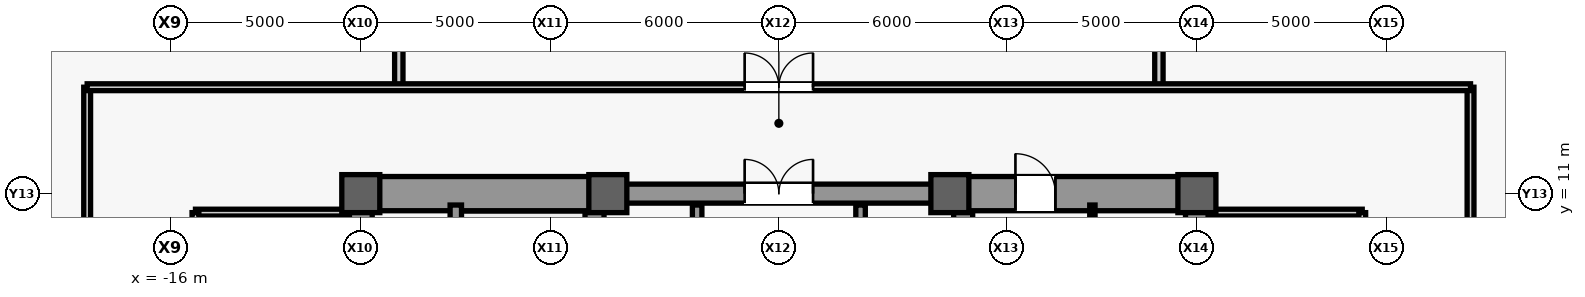
"""IFC4 building model, lengths in metres.
Left out: names, types, materials, properties, quantities, classifications, styles, units other than length and angle.
Written with IfcOpenShell. Run it as: python <this file> out.ifc"""

import sys

from ifc_helpers import new_model, si_unit, direction, frame, frame_2d, origin, origin_2d, place, context, subcontext, project, spatial, rectangle, extrude, source, transform, mapped, element, fill, save


model = new_model("IFC4")
c1 = context("Model", 3, precision=1e-05, world=origin(), true_north=direction((0.0, 1.0)))
c2 = subcontext(c1, "Body", "Model", "MODEL_VIEW")
j1 = project(units=[si_unit("LENGTHUNIT", "METRE"), si_unit("PLANEANGLEUNIT", "RADIAN")], contexts=[c1])
p1 = place(None, origin())
s1 = spatial("IfcSite", under=j1, at=p1, CompositionType="ELEMENT")
p2 = place(p1, origin())
s2 = spatial("IfcBuilding", under=s1, at=p2, CompositionType="ELEMENT")
p3 = place(p2, origin())
s3 = spatial("IfcBuildingStorey", under=s2, at=p3, CompositionType="ELEMENT", Elevation=0.0)
m1 = source(origin(), c2, "Body", "SweptSolid", [
    extrude(rectangle(XDim=22.0, YDim=0.6, at=frame_2d((11.0, 0.0))), origin(), (0.0, 0.0, 1.0), 6.28),
])
p4 = place(p3, frame((-11.0, -11.0, 0.0), z_axis=(0.0, 0.0, 1.0), x_axis=(0.0, 1.0, 0.0)))
e1 = element("IfcWall", 1, at=p4, inside=s3, PredefinedType="SHEAR", context=c2, shape_type="MappedRepresentation", body=[
    mapped(m1, transform((0.0, 0.0, 0.0), scale=1.0)),
])
m2 = source(origin(), c2, "Body", "SweptSolid", [
    extrude(rectangle(XDim=1.1, YDim=2.2, at=frame_2d((0.55, 1.1))), frame((0.0, 0.31, 0.0), z_axis=(0.0, -1.0, 0.0), x_axis=(1.0, 0.0, 0.0)), (0.0, 0.0, 1.0), 0.62),
])
p5 = place(p4, frame((0.8, 0.0, 0.0)))
e2 = element("IfcOpeningElement", 2, at=p5, cuts=e1, PredefinedType="OPENING", context=c2, shape_type="MappedRepresentation", body=[
    mapped(m2, transform((0.0, 0.0, 0.0), scale=1.0)),
])
p6 = place(p4, frame((12.5, 0.0, 0.0)))
e3 = element("IfcOpeningElement", 3, at=p6, cuts=e1, PredefinedType="OPENING", context=c2, shape_type="MappedRepresentation", body=[
    mapped(m2, transform((0.0, 0.0, 0.0), scale=1.0)),
])
m3 = source(origin(), c2, "Body", "SweptSolid", [
    extrude(rectangle(XDim=0.9, YDim=2.15, at=frame_2d((0.45, 1.075))), frame((0.0, 0.31, 0.0), z_axis=(0.0, -1.0, 0.0), x_axis=(1.0, 0.0, 0.0)), (0.0, 0.0, 1.0), 0.62),
])
p7 = place(p4, frame((6.85, 0.0, 0.0)))
e4 = element("IfcOpeningElement", 4, at=p7, cuts=e1, PredefinedType="OPENING", context=c2, shape_type="MappedRepresentation", body=[
    mapped(m3, transform((0.0, 0.0, 0.0), scale=1.0)),
])
m4 = source(origin(), c2, "Body", "SweptSolid", [
    extrude(rectangle(XDim=1.2, YDim=2.3, at=frame_2d((0.6, 1.15))), frame((0.0, 0.31, 0.0), z_axis=(0.0, -1.0, 0.0), x_axis=(1.0, 0.0, 0.0)), (0.0, 0.0, 1.0), 0.62),
])
p8 = place(p4, frame((14.6, 0.0, 0.0)))
e5 = element("IfcOpeningElement", 5, at=p8, cuts=e1, PredefinedType="OPENING", context=c2, shape_type="MappedRepresentation", body=[
    mapped(m4, transform((0.0, 0.0, 0.0), scale=1.0)),
])
p9 = place(p4, frame((18.2, 0.0, 0.0)))
e6 = element("IfcOpeningElement", 6, at=p9, cuts=e1, PredefinedType="OPENING", context=c2, shape_type="MappedRepresentation", body=[
    mapped(m4, transform((0.0, 0.0, 0.0), scale=1.0)),
])
m5 = source(origin(), c2, "Body", "SweptSolid", [
    extrude(rectangle(XDim=1.3, YDim=2.3, at=frame_2d((0.65, 1.15))), frame((0.0, 0.31, 0.0), z_axis=(0.0, -1.0, 0.0), x_axis=(1.0, 0.0, 0.0)), (0.0, 0.0, 1.0), 0.62),
])
p10 = place(p4, frame((2.7, 0.0, 0.0)))
e7 = element("IfcOpeningElement", 7, at=p10, cuts=e1, PredefinedType="OPENING", context=c2, shape_type="MappedRepresentation", body=[
    mapped(m5, transform((0.0, 0.0, 0.0), scale=1.0)),
])
p11 = place(p3, frame((11.0, -11.0, 0.0), z_axis=(0.0, 0.0, 1.0), x_axis=(0.0, 1.0, 0.0)))
e8 = element("IfcWall", 8, at=p11, inside=s3, PredefinedType="SHEAR", context=c2, shape_type="MappedRepresentation", body=[
    mapped(m1, transform((0.0, 0.0, 0.0), scale=1.0)),
])
p12 = place(p11, frame((0.8, 0.0, 0.0)))
e9 = element("IfcOpeningElement", 9, at=p12, cuts=e8, PredefinedType="OPENING", context=c2, shape_type="MappedRepresentation", body=[
    mapped(m2, transform((0.0, 0.0, 0.0), scale=1.0)),
])
p13 = place(p11, frame((6.2, 0.0, 0.0)))
e10 = element("IfcOpeningElement", 10, at=p13, cuts=e8, PredefinedType="OPENING", context=c2, shape_type="MappedRepresentation", body=[
    mapped(m3, transform((0.0, 0.0, 0.0), scale=1.0)),
])
p14 = place(p11, frame((8.05, 0.0, 0.0)))
e11 = element("IfcOpeningElement", 11, at=p14, cuts=e8, PredefinedType="OPENING", context=c2, shape_type="MappedRepresentation", body=[
    mapped(m3, transform((0.0, 0.0, 0.0), scale=1.0)),
])
p15 = place(p11, frame((2.7, 0.0, 0.0)))
e12 = element("IfcOpeningElement", 12, at=p15, cuts=e8, PredefinedType="OPENING", context=c2, shape_type="MappedRepresentation", body=[
    mapped(m5, transform((0.0, 0.0, 0.0), scale=1.0)),
])
p16 = place(p11, frame((13.35, 0.0, 0.0)))
e13 = element("IfcOpeningElement", 13, at=p16, cuts=e8, PredefinedType="OPENING", context=c2, shape_type="MappedRepresentation", body=[
    mapped(m5, transform((0.0, 0.0, 0.0), scale=1.0)),
])
m6 = source(origin(), c2, "Body", "SweptSolid", [
    extrude(rectangle(XDim=21.4, YDim=0.5, at=frame_2d((10.7, 0.0))), origin(), (0.0, 0.0, 1.0), 6.28),
])
for number, where, z_axis, x_axis in (
    (14, (-4.85, -10.7, 0.0), (0.0, 0.0, 1.0), (0.0, 1.0, 0.0)),
    (15, (4.85, -10.7, 0.0), (0.0, 0.0, 1.0), (0.0, 1.0, 0.0)),
):
    element("IfcWall", number, at=place(p3, frame(where, z_axis=z_axis, x_axis=x_axis)), inside=s3, PredefinedType="SHEAR", context=c2, shape_type="MappedRepresentation", body=[
        mapped(m6, transform((0.0, 0.0, 0.0), scale=1.0)),
    ])
m7 = source(origin(), c2, "Body", "SweptSolid", [
    extrude(rectangle(XDim=5.85, YDim=0.9, at=frame_2d((2.925, 0.0))), origin(), (0.0, 0.0, 1.0), 6.28),
])
p17 = place(p3, frame((-10.7, 11.0, 0.0), z_axis=(0.0, 0.0, 1.0), x_axis=(1.0, 0.0, 0.0)))
e16 = element("IfcWall", 16, at=p17, inside=s3, PredefinedType="SHEAR", context=c2, shape_type="MappedRepresentation", body=[
    mapped(m7, transform((0.0, 0.0, 0.0), scale=1.0)),
])
p18 = place(p3, frame((4.85, 11.0, 0.0), z_axis=(0.0, 0.0, 1.0), x_axis=(1.0, 0.0, 0.0)))
e17 = element("IfcWall", 17, at=p18, inside=s3, PredefinedType="SHEAR", context=c2, shape_type="MappedRepresentation", body=[
    mapped(m7, transform((0.0, 0.0, 0.0), scale=1.0)),
])
m8 = source(origin(), c2, "Body", "SweptSolid", [
    extrude(rectangle(XDim=1.05, YDim=2.2, at=frame_2d((0.525, 1.1))), frame((0.0, 0.46, 0.0), z_axis=(0.0, -1.0, 0.0), x_axis=(1.0, 0.0, 0.0)), (0.0, 0.0, 1.0), 0.92),
])
p19 = place(p18, frame((1.375, 0.0, 0.0)))
e18 = element("IfcOpeningElement", 18, at=p19, cuts=e17, PredefinedType="OPENING", context=c2, shape_type="MappedRepresentation", body=[
    mapped(m8, transform((0.0, 0.0, 0.0), scale=1.0)),
])
m9 = source(origin(), c2, "Body", "SweptSolid", [
    extrude(rectangle(XDim=9.2, YDim=0.5, at=frame_2d((4.6, 0.0))), origin(), (0.0, 0.0, 1.0), 6.28),
])
p20 = place(p3, frame((-4.6, 11.0, 0.0), z_axis=(0.0, 0.0, 1.0), x_axis=(1.0, 0.0, 0.0)))
e19 = element("IfcWall", 19, at=p20, inside=s3, PredefinedType="SHEAR", context=c2, shape_type="MappedRepresentation", body=[
    mapped(m9, transform((0.0, 0.0, 0.0), scale=1.0)),
])
m10 = source(origin(), c2, "Body", "SweptSolid", [
    extrude(rectangle(XDim=1.8, YDim=2.25, at=frame_2d((0.9, 1.125))), frame((0.0, 0.26, 0.0), z_axis=(0.0, -1.0, 0.0), x_axis=(1.0, 0.0, 0.0)), (0.0, 0.0, 1.0), 0.52),
])
p21 = place(p20, frame((3.7, 0.0, 0.0)))
e20 = element("IfcOpeningElement", 20, at=p21, cuts=e19, PredefinedType="OPENING", context=c2, shape_type="MappedRepresentation", body=[
    mapped(m10, transform((0.0, 0.0, 0.0), scale=1.0)),
])
m11 = source(origin(), c2, "Body", "SweptSolid", [
    extrude(rectangle(XDim=1.0, YDim=1.0, at=origin_2d()), origin(), (0.0, 0.0, 1.0), 6.6),
])
for number, where, z_axis, x_axis in (
    (21, (-11.0, 11.0, 0.0), (0.0, 0.0, 1.0), (1.0, 0.0, 0.0)),
    (22, (-4.5, 11.0, 0.0), (0.0, 0.0, 1.0), (1.0, 0.0, 0.0)),
    (23, (4.5, 11.0, 0.0), (0.0, 0.0, 1.0), (1.0, 0.0, 0.0)),
    (24, (11.0, 11.0, 0.0), (0.0, 0.0, 1.0), (1.0, 0.0, 0.0)),
):
    element("IfcColumn", number, at=place(p3, frame(where, z_axis=z_axis, x_axis=x_axis)), inside=s3, PredefinedType="COLUMN", context=c2, shape_type="MappedRepresentation", body=[
        mapped(m11, transform((0.0, 0.0, 0.0), scale=1.0)),
    ])
m12 = source(origin(), c2, "Body", "SweptSolid", [
    extrude(rectangle(XDim=7.75, YDim=0.3, at=frame_2d((3.875, 0.0))), origin(), (0.0, 0.0, 1.0), 6.28),
])
p22 = place(p3, frame((-8.5, 2.95, 0.0), z_axis=(0.0, 0.0, 1.0), x_axis=(0.0, 1.0, 0.0)))
e25 = element("IfcWall", 25, at=p22, inside=s3, PredefinedType="SHEAR", context=c2, shape_type="MappedRepresentation", body=[
    mapped(m12, transform((0.0, 0.0, 0.0), scale=1.0)),
])
m13 = source(origin(), c2, "Body", "SweptSolid", [
    extrude(rectangle(XDim=9.4, YDim=0.14, at=frame_2d((4.7, 0.0))), origin(), (0.0, 0.0, 1.0), 6.28),
])
p23 = place(p3, frame((8.25, 1.3, 0.0), z_axis=(0.0, 0.0, 1.0), x_axis=(0.0, 1.0, 0.0)))
e26 = element("IfcWall", 26, at=p23, inside=s3, PredefinedType="PARTITIONING", context=c2, shape_type="MappedRepresentation", body=[
    mapped(m13, transform((0.0, 0.0, 0.0), scale=1.0)),
])
m14 = source(origin(), c2, "Body", "SweptSolid", [
    extrude(rectangle(XDim=4.05, YDim=0.18, at=frame_2d((2.025, 0.0))), origin(), (0.0, 0.0, 1.0), 6.28),
])
p24 = place(p3, frame((-15.35, 10.5, 0.0), z_axis=(0.0, 0.0, 1.0), x_axis=(1.0, 0.0, 0.0)))
e27 = element("IfcWall", 27, at=p24, inside=s3, PredefinedType="PARTITIONING", context=c2, shape_type="MappedRepresentation", body=[
    mapped(m14, transform((0.0, 0.0, 0.0), scale=1.0)),
])
m15 = source(origin(), c2, "Body", "SweptSolid", [
    extrude(rectangle(XDim=16.6, YDim=0.18, at=frame_2d((8.3, 0.0))), origin(), (0.0, 0.0, 1.0), 6.28),
])
p25 = place(p3, frame((-15.35, -6.1, 0.0), z_axis=(0.0, 0.0, 1.0), x_axis=(0.0, 1.0, 0.0)))
e28 = element("IfcWall", 28, at=p25, inside=s3, PredefinedType="PARTITIONING", context=c2, shape_type="MappedRepresentation", body=[
    mapped(m15, transform((0.0, 0.0, 0.0), scale=1.0)),
])
m16 = source(origin(), c2, "Body", "SweptSolid", [
    extrude(rectangle(XDim=1.8, YDim=2.25, at=frame_2d((0.9, 1.125))), frame((0.0, 0.1, 0.0), z_axis=(0.0, -1.0, 0.0), x_axis=(1.0, 0.0, 0.0)), (0.0, 0.0, 1.0), 0.2),
])
p26 = place(p25, frame((2.7, 0.0, 0.0)))
e29 = element("IfcOpeningElement", 29, at=p26, cuts=e28, PredefinedType="OPENING", context=c2, shape_type="MappedRepresentation", body=[
    mapped(m16, transform((0.0, 0.0, 0.0), scale=1.0)),
])
p27 = place(p25, frame((11.0, 0.0, 0.0)))
e30 = element("IfcOpeningElement", 30, at=p27, cuts=e28, PredefinedType="OPENING", context=c2, shape_type="MappedRepresentation", body=[
    mapped(m16, transform((0.0, 0.0, 0.0), scale=1.0)),
])
p28 = place(p3, frame((11.3, 10.5, 0.0), z_axis=(0.0, 0.0, 1.0), x_axis=(1.0, 0.0, 0.0)))
e31 = element("IfcWall", 31, at=p28, inside=s3, PredefinedType="PARTITIONING", context=c2, shape_type="MappedRepresentation", body=[
    mapped(m14, transform((0.0, 0.0, 0.0), scale=1.0)),
])
p29 = place(p3, frame((15.35, -6.1, 0.0), z_axis=(0.0, 0.0, 1.0), x_axis=(0.0, 1.0, 0.0)))
e32 = element("IfcWall", 32, at=p29, inside=s3, PredefinedType="PARTITIONING", context=c2, shape_type="MappedRepresentation", body=[
    mapped(m15, transform((0.0, 0.0, 0.0), scale=1.0)),
])
p30 = place(p29, frame((2.7, 0.0, 0.0)))
e33 = element("IfcOpeningElement", 33, at=p30, cuts=e32, PredefinedType="OPENING", context=c2, shape_type="MappedRepresentation", body=[
    mapped(m16, transform((0.0, 0.0, 0.0), scale=1.0)),
])
p31 = place(p29, frame((13.0, 0.0, 0.0)))
e34 = element("IfcOpeningElement", 34, at=p31, cuts=e32, PredefinedType="OPENING", context=c2, shape_type="MappedRepresentation", body=[
    mapped(m16, transform((0.0, 0.0, 0.0), scale=1.0)),
])
m17 = source(origin(), c2, "Body", "SweptSolid", [
    extrude(rectangle(XDim=5.4, YDim=0.25, at=frame_2d((2.7, 0.0))), origin(), (0.0, 0.0, 1.0), 6.28),
])
p32 = place(p3, frame((-2.15, 5.3, 0.0), z_axis=(0.0, 0.0, 1.0), x_axis=(0.0, 1.0, 0.0)))
e35 = element("IfcWall", 35, at=p32, inside=s3, PredefinedType="SHEAR", context=c2, shape_type="MappedRepresentation", body=[
    mapped(m17, transform((0.0, 0.0, 0.0), scale=1.0)),
])
m18 = source(origin(), c2, "Body", "SweptSolid", [
    extrude(rectangle(XDim=1.2, YDim=2.3, at=frame_2d((0.6, 1.15))), frame((0.0, 0.135, 0.0), z_axis=(0.0, -1.0, 0.0), x_axis=(1.0, 0.0, 0.0)), (0.0, 0.0, 1.0), 0.27),
])
p33 = place(p32, frame((3.3, 0.0, 0.0)))
e36 = element("IfcOpeningElement", 36, at=p33, cuts=e35, PredefinedType="OPENING", context=c2, shape_type="MappedRepresentation", body=[
    mapped(m18, transform((0.0, 0.0, 0.0), scale=1.0)),
])
p34 = place(p3, frame((2.15, 5.3, 0.0), z_axis=(0.0, 0.0, 1.0), x_axis=(0.0, 1.0, 0.0)))
e37 = element("IfcWall", 37, at=p34, inside=s3, PredefinedType="SHEAR", context=c2, shape_type="MappedRepresentation", body=[
    mapped(m17, transform((0.0, 0.0, 0.0), scale=1.0)),
])
p35 = place(p34, frame((3.3, 0.0, 0.0)))
e38 = element("IfcOpeningElement", 38, at=p35, cuts=e37, PredefinedType="OPENING", context=c2, shape_type="MappedRepresentation", body=[
    mapped(m18, transform((0.0, 0.0, 0.0), scale=1.0)),
])
m19 = source(origin(), c2, "Body", "SweptSolid", [
    extrude(rectangle(XDim=27.0, YDim=0.18, at=frame_2d((13.5, 0.0))), origin(), (0.0, 0.0, 1.0), 6.28),
])
p36 = place(p3, frame((-18.2, -13.2, 0.0), z_axis=(0.0, 0.0, 1.0), x_axis=(0.0, 1.0, 0.0)))
e39 = element("IfcWall", 39, at=p36, inside=s3, PredefinedType="PARTITIONING", context=c2, shape_type="MappedRepresentation", body=[
    mapped(m19, transform((0.0, 0.0, 0.0), scale=1.0)),
])
m20 = source(origin(), c2, "Body", "SweptSolid", [
    extrude(rectangle(XDim=0.9, YDim=2.15, at=frame_2d((0.45, 1.075))), frame((0.0, 0.1, 0.0), z_axis=(0.0, -1.0, 0.0), x_axis=(1.0, 0.0, 0.0)), (0.0, 0.0, 1.0), 0.2),
])
p37 = place(p36, frame((6.55, 0.0, 0.0)))
e40 = element("IfcOpeningElement", 40, at=p37, cuts=e39, PredefinedType="OPENING", context=c2, shape_type="MappedRepresentation", body=[
    mapped(m20, transform((0.0, 0.0, 0.0), scale=1.0)),
])
m21 = source(origin(), c2, "Body", "SweptSolid", [
    extrude(rectangle(XDim=1.05, YDim=2.2, at=frame_2d((0.525, 1.1))), frame((0.0, 0.1, 0.0), z_axis=(0.0, -1.0, 0.0), x_axis=(1.0, 0.0, 0.0)), (0.0, 0.0, 1.0), 0.2),
])
p38 = place(p36, frame((17.675, 0.0, 0.0)))
e41 = element("IfcOpeningElement", 41, at=p38, cuts=e39, PredefinedType="OPENING", context=c2, shape_type="MappedRepresentation", body=[
    mapped(m21, transform((0.0, 0.0, 0.0), scale=1.0)),
])
p39 = place(p3, frame((18.2, -13.2, 0.0), z_axis=(0.0, 0.0, 1.0), x_axis=(0.0, 1.0, 0.0)))
e42 = element("IfcWall", 42, at=p39, inside=s3, PredefinedType="PARTITIONING", context=c2, shape_type="MappedRepresentation", body=[
    mapped(m19, transform((0.0, 0.0, 0.0), scale=1.0)),
])
p40 = place(p39, frame((18.8, 0.0, 0.0)))
e43 = element("IfcOpeningElement", 43, at=p40, cuts=e42, PredefinedType="OPENING", context=c2, shape_type="MappedRepresentation", body=[
    mapped(m16, transform((0.0, 0.0, 0.0), scale=1.0)),
])
m22 = source(origin(), c2, "Body", "SweptSolid", [
    extrude(rectangle(XDim=24.2, YDim=0.22, at=frame_2d((12.1, 0.0))), origin(), (0.0, 0.0, 1.0), 6.28),
])
p41 = place(p3, frame((-10.0, 13.8, 0.0), z_axis=(0.0, 0.0, 1.0), x_axis=(0.0, 1.0, 0.0)))
e44 = element("IfcWall", 44, at=p41, inside=s3, PredefinedType="PARTITIONING", context=c2, shape_type="MappedRepresentation", body=[
    mapped(m22, transform((0.0, 0.0, 0.0), scale=1.0)),
])
m23 = source(origin(), c2, "Body", "SweptSolid", [
    extrude(rectangle(XDim=1.5, YDim=2.3, at=frame_2d((0.75, 1.15))), frame((0.0, 0.12, 0.0), z_axis=(0.0, -1.0, 0.0), x_axis=(1.0, 0.0, 0.0)), (0.0, 0.0, 1.0), 0.24),
])
p42 = place(p41, frame((5.45, 0.0, 0.0)))
e45 = element("IfcOpeningElement", 45, at=p42, cuts=e44, PredefinedType="OPENING", context=c2, shape_type="MappedRepresentation", body=[
    mapped(m23, transform((0.0, 0.0, 0.0), scale=1.0)),
])
m24 = source(origin(), c2, "Body", "SweptSolid", [
    extrude(rectangle(XDim=16.6, YDim=0.22, at=frame_2d((8.3, 0.0))), origin(), (0.0, 0.0, 1.0), 6.28),
])
p43 = place(p3, frame((10.0, 13.8, 0.0), z_axis=(0.0, 0.0, 1.0), x_axis=(0.0, 1.0, 0.0)))
e46 = element("IfcWall", 46, at=p43, inside=s3, PredefinedType="PARTITIONING", context=c2, shape_type="MappedRepresentation", body=[
    mapped(m24, transform((0.0, 0.0, 0.0), scale=1.0)),
])
p44 = place(p43, frame((5.45, 0.0, 0.0)))
e47 = element("IfcOpeningElement", 47, at=p44, cuts=e46, PredefinedType="OPENING", context=c2, shape_type="MappedRepresentation", body=[
    mapped(m23, transform((0.0, 0.0, 0.0), scale=1.0)),
])
m25 = source(origin(), c2, "Body", "SweptSolid", [
    extrude(rectangle(XDim=36.4, YDim=0.18, at=frame_2d((18.2, 0.0))), origin(), (0.0, 0.0, 1.0), 6.28),
])
p45 = place(p3, frame((-18.2, 13.8, 0.0), z_axis=(0.0, 0.0, 1.0), x_axis=(1.0, 0.0, 0.0)))
e48 = element("IfcWall", 48, at=p45, inside=s3, PredefinedType="PARTITIONING", context=c2, shape_type="MappedRepresentation", body=[
    mapped(m25, transform((0.0, 0.0, 0.0), scale=1.0)),
])
p46 = place(p45, frame((17.3, 0.0, 0.0)))
e49 = element("IfcOpeningElement", 49, at=p46, cuts=e48, PredefinedType="OPENING", context=c2, shape_type="MappedRepresentation", body=[
    mapped(m16, transform((0.0, 0.0, 0.0), scale=1.0)),
])
m26 = source(origin(), c2, "Body", "SweptSolid", [
    extrude(rectangle(XDim=1.05, YDim=2.2, at=frame_2d((0.525, 1.1))), frame((0.0, 0.025, 0.0), z_axis=(0.0, -1.0, 0.0), x_axis=(1.0, 0.0, 0.0)), (0.0, 0.0, 1.0), 0.05),
])
p47 = place(p19, origin())
e50 = element("IfcDoor", 50, at=p47, inside=s3, OperationType="SINGLE_SWING_LEFT", PredefinedType="DOOR", context=c2, shape_type="MappedRepresentation", body=[
    mapped(m26, transform((0.0, 0.0, 0.0), scale=1.0)),
])
fill(e18, e50)
m27 = source(origin(), c2, "Body", "SweptSolid", [
    extrude(rectangle(XDim=1.8, YDim=2.25, at=frame_2d((0.9, 1.125))), frame((0.0, 0.025, 0.0), z_axis=(0.0, -1.0, 0.0), x_axis=(1.0, 0.0, 0.0)), (0.0, 0.0, 1.0), 0.05),
])
p48 = place(p21, origin())
e51 = element("IfcDoor", 51, at=p48, inside=s3, OperationType="SINGLE_SWING_RIGHT", PredefinedType="DOOR", context=c2, shape_type="MappedRepresentation", body=[
    mapped(m27, transform((0.0, 0.0, 0.0), scale=1.0)),
])
fill(e20, e51)
p49 = place(p46, origin())
e52 = element("IfcDoor", 52, at=p49, inside=s3, OperationType="SINGLE_SWING_LEFT", PredefinedType="DOOR", context=c2, shape_type="MappedRepresentation", body=[
    mapped(m27, transform((0.0, 0.0, 0.0), scale=1.0)),
])
fill(e49, e52)
save(model, sys.argv[1])
